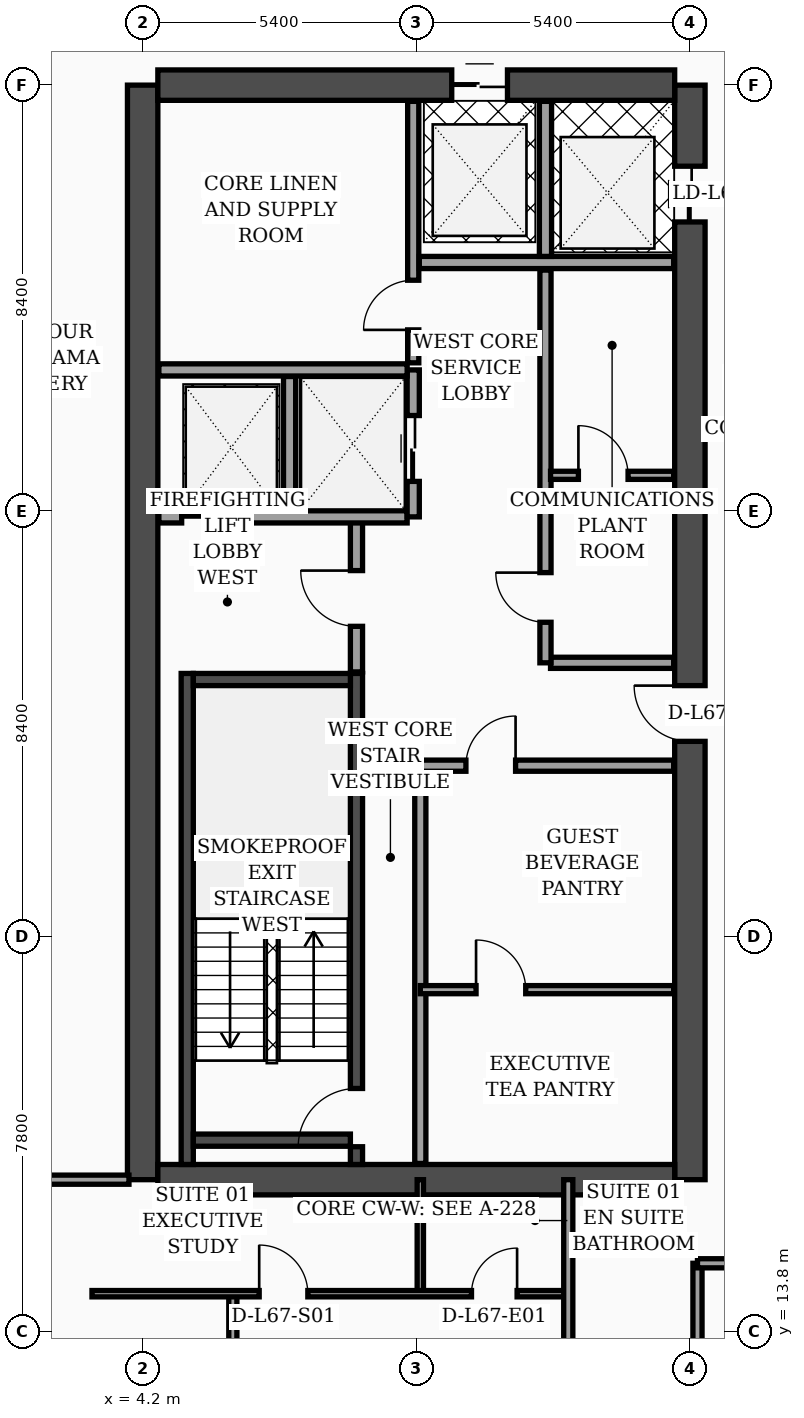
"""IFC4 building model, lengths in metres.
Left out: names, types, materials, properties, quantities, classifications, styles, units other than length and angle.
Written with IfcOpenShell. Run it as: python <this file> out.ifc"""

import sys

from ifc_helpers import new_model, si_unit, direction, frame, frame_2d, origin, place, context, subcontext, project, spatial, rectangle, extrude, element, fill, save


model = new_model("IFC4")
c1 = context("Model", 3, precision=1e-05, world=origin(), true_north=direction((0.0, 1.0)))
c2 = subcontext(c1, "Body", "Model", "MODEL_VIEW")
j1 = project(units=[si_unit("LENGTHUNIT", "METRE"), si_unit("PLANEANGLEUNIT", "RADIAN")], contexts=[c1])
p1 = place(None, origin())
s1 = spatial("IfcSite", under=j1, at=p1, CompositionType="ELEMENT")
p2 = place(p1, origin())
s2 = spatial("IfcBuilding", under=s1, at=p2, CompositionType="ELEMENT")
p3 = place(p2, frame((0.0, 0.0, 271.1)))
s3 = spatial("IfcBuildingStorey", under=s2, at=p3, CompositionType="ELEMENT", Elevation=271.1)
p4 = place(p3, frame((4.2, 16.8, 0.0), z_axis=(0.0, 0.0, 1.0), x_axis=(0.0, 1.0, 0.0)))
e1 = element("IfcWall", 1, at=p4, inside=s3, PredefinedType="SHEAR", context=c2, shape_type="SweptSolid", body=[
    extrude(rectangle(XDim=21.6, YDim=0.6, at=frame_2d((10.8, 0.0))), origin(), (0.0, 0.0, 1.0), 3.56),
])
p5 = place(p3, frame((15.0, 16.8, 0.0), z_axis=(0.0, 0.0, 1.0), x_axis=(0.0, 1.0, 0.0)))
e2 = element("IfcWall", 2, at=p5, inside=s3, PredefinedType="SHEAR", context=c2, shape_type="SweptSolid", body=[
    extrude(rectangle(XDim=21.6, YDim=0.6, at=frame_2d((10.8, 0.0))), origin(), (0.0, 0.0, 1.0), 3.56),
])
p6 = place(p5, frame((8.65, 0.0, 0.0)))
e3 = element("IfcOpeningElement", 3, at=p6, cuts=e2, PredefinedType="OPENING", context=c2, shape_type="SweptSolid", body=[
    extrude(rectangle(XDim=1.1, YDim=2.2, at=frame_2d((0.55, 1.1))), frame((0.0, 0.31, 0.0), z_axis=(0.0, -1.0, 0.0), x_axis=(1.0, 0.0, 0.0)), (0.0, 0.0, 1.0), 0.62),
])
p7 = place(p5, frame((18.9, 0.0, 0.0)))
e4 = element("IfcOpeningElement", 4, at=p7, cuts=e2, PredefinedType="OPENING", context=c2, shape_type="SweptSolid", body=[
    extrude(rectangle(XDim=1.1, YDim=2.2, at=frame_2d((0.55, 1.1))), frame((0.0, 0.31, 0.0), z_axis=(0.0, -1.0, 0.0), x_axis=(1.0, 0.0, 0.0)), (0.0, 0.0, 1.0), 0.62),
])
p8 = place(p3, frame((4.5, 38.4, 0.0), z_axis=(0.0, 0.0, 1.0), x_axis=(1.0, 0.0, 0.0)))
e5 = element("IfcWall", 5, at=p8, inside=s3, PredefinedType="SHEAR", context=c2, shape_type="SweptSolid", body=[
    extrude(rectangle(XDim=10.2, YDim=0.6, at=frame_2d((5.1, 0.0))), origin(), (0.0, 0.0, 1.0), 3.56),
])
p9 = place(p8, frame((5.8, 0.0, 0.0)))
e6 = element("IfcOpeningElement", 6, at=p9, cuts=e5, PredefinedType="OPENING", context=c2, shape_type="SweptSolid", body=[
    extrude(rectangle(XDim=1.1, YDim=2.2, at=frame_2d((0.55, 1.1))), frame((0.0, 0.31, 0.0), z_axis=(0.0, -1.0, 0.0), x_axis=(1.0, 0.0, 0.0)), (0.0, 0.0, 1.0), 0.62),
])
p10 = place(p3, frame((4.5, 16.8, 0.0), z_axis=(0.0, 0.0, 1.0), x_axis=(1.0, 0.0, 0.0)))
e7 = element("IfcWall", 7, at=p10, inside=s3, PredefinedType="SHEAR", context=c2, shape_type="SweptSolid", body=[
    extrude(rectangle(XDim=10.2, YDim=0.6, at=frame_2d((5.1, 0.0))), origin(), (0.0, 0.0, 1.0), 3.56),
])
p11 = place(p3, frame((5.08, 17.1, 0.0), z_axis=(0.0, 0.0, 1.0), x_axis=(0.0, 1.0, 0.0)))
e8 = element("IfcWall", 8, at=p11, inside=s3, PredefinedType="SOLIDWALL", context=c2, shape_type="SweptSolid", body=[
    extrude(rectangle(XDim=9.69, YDim=0.24, at=frame_2d((4.845, 0.0))), origin(), (0.0, 0.0, 1.0), 3.56),
])
p12 = place(p3, frame((8.42, 17.1, 0.0), z_axis=(0.0, 0.0, 1.0), x_axis=(0.0, 1.0, 0.0)))
e9 = element("IfcWall", 9, at=p12, inside=s3, PredefinedType="SOLIDWALL", context=c2, shape_type="SweptSolid", body=[
    extrude(rectangle(XDim=9.69, YDim=0.24, at=frame_2d((4.845, 0.0))), origin(), (0.0, 0.0, 1.0), 3.56),
])
p13 = place(p12, frame((0.35, 0.0, 0.0)))
e10 = element("IfcOpeningElement", 10, at=p13, cuts=e9, PredefinedType="OPENING", context=c2, shape_type="SweptSolid", body=[
    extrude(rectangle(XDim=1.15, YDim=2.2, at=frame_2d((0.575, 1.1))), frame((0.0, 0.13, 0.0), z_axis=(0.0, -1.0, 0.0), x_axis=(1.0, 0.0, 0.0)), (0.0, 0.0, 1.0), 0.26),
])
for number, where, z_axis, x_axis in (
    (11, (5.2, 17.58, 0.0), (0.0, 0.0, 1.0), (1.0, 0.0, 0.0)),
    (12, (5.2, 26.67, 0.0), (0.0, 0.0, 1.0), (1.0, 0.0, 0.0)),
):
    element("IfcWall", number, at=place(p3, frame(where, z_axis=z_axis, x_axis=x_axis)), inside=s3, PredefinedType="SOLIDWALL", context=c2, shape_type="SweptSolid", body=[
        extrude(rectangle(XDim=3.1, YDim=0.24, at=frame_2d((1.55, 0.0))), origin(), (0.0, 0.0, 1.0), 3.56),
    ])
p14 = place(p3, frame((8.42, 26.82, 0.0), z_axis=(0.0, 0.0, 1.0), x_axis=(0.0, 1.0, 0.0)))
e13 = element("IfcWall", 13, at=p14, inside=s3, PredefinedType="SOLIDWALL", context=c2, shape_type="SweptSolid", body=[
    extrude(rectangle(XDim=3.0, YDim=0.24, at=frame_2d((1.5, 0.0))), origin(), (0.0, 0.0, 1.0), 3.56),
])
p15 = place(p14, frame((0.9, 0.0, 0.0)))
e14 = element("IfcOpeningElement", 14, at=p15, cuts=e13, PredefinedType="OPENING", context=c2, shape_type="SweptSolid", body=[
    extrude(rectangle(XDim=1.1, YDim=2.2, at=frame_2d((0.55, 1.1))), frame((0.0, 0.13, 0.0), z_axis=(0.0, -1.0, 0.0), x_axis=(1.0, 0.0, 0.0)), (0.0, 0.0, 1.0), 0.26),
])
p16 = place(p3, frame((4.52, 29.88, 0.0), z_axis=(0.0, 0.0, 1.0), x_axis=(1.0, 0.0, 0.0)))
e15 = element("IfcWall", 15, at=p16, inside=s3, PredefinedType="SOLIDWALL", context=c2, shape_type="SweptSolid", body=[
    extrude(rectangle(XDim=4.9, YDim=0.24, at=frame_2d((2.45, 0.0))), origin(), (0.0, 0.0, 1.0), 3.56),
])
p17 = place(p16, frame((0.45, 0.0, 0.0)))
e16 = element("IfcOpeningElement", 16, at=p17, cuts=e15, PredefinedType="OPENING", context=c2, shape_type="SweptSolid", body=[
    extrude(rectangle(XDim=1.3, YDim=2.35, at=frame_2d((0.65, 1.175))), frame((0.0, 0.13, 0.0), z_axis=(0.0, -1.0, 0.0), x_axis=(1.0, 0.0, 0.0)), (0.0, 0.0, 1.0), 0.26),
])
p18 = place(p3, frame((7.1, 30.02, 0.0), z_axis=(0.0, 0.0, 1.0), x_axis=(0.0, 1.0, 0.0)))
e17 = element("IfcWall", 17, at=p18, inside=s3, PredefinedType="SOLIDWALL", context=c2, shape_type="SweptSolid", body=[
    extrude(rectangle(XDim=2.63, YDim=0.24, at=frame_2d((1.315, 0.0))), origin(), (0.0, 0.0, 1.0), 3.56),
])
p19 = place(p3, frame((9.54, 29.88, 0.0), z_axis=(0.0, 0.0, 1.0), x_axis=(0.0, 1.0, 0.0)))
e18 = element("IfcWall", 18, at=p19, inside=s3, PredefinedType="SOLIDWALL", context=c2, shape_type="SweptSolid", body=[
    extrude(rectangle(XDim=2.9, YDim=0.24, at=frame_2d((1.45, 0.0))), origin(), (0.0, 0.0, 1.0), 3.56),
])
p20 = place(p19, frame((0.7, 0.0, 0.0)))
e19 = element("IfcOpeningElement", 19, at=p20, cuts=e18, PredefinedType="OPENING", context=c2, shape_type="SweptSolid", body=[
    extrude(rectangle(XDim=1.3, YDim=2.35, at=frame_2d((0.65, 1.175))), frame((0.0, 0.13, 0.0), z_axis=(0.0, -1.0, 0.0), x_axis=(1.0, 0.0, 0.0)), (0.0, 0.0, 1.0), 0.26),
])
p21 = place(p3, frame((4.52, 32.78, 0.0), z_axis=(0.0, 0.0, 1.0), x_axis=(1.0, 0.0, 0.0)))
e20 = element("IfcWall", 20, at=p21, inside=s3, PredefinedType="SOLIDWALL", context=c2, shape_type="SweptSolid", body=[
    extrude(rectangle(XDim=4.9, YDim=0.24, at=frame_2d((2.45, 0.0))), origin(), (0.0, 0.0, 1.0), 3.19),
])
p22 = place(p3, frame((9.68, 17.12, 0.0), z_axis=(0.0, 0.0, 1.0), x_axis=(0.0, 1.0, 0.0)))
e21 = element("IfcWall", 21, at=p22, inside=s3, PredefinedType="SOLIDWALL", context=c2, shape_type="SweptSolid", body=[
    extrude(rectangle(XDim=7.88, YDim=0.22, at=frame_2d((3.94, 0.0))), origin(), (0.0, 0.0, 1.0), 3.56),
])
p23 = place(p3, frame((9.54, 32.92, 0.0), z_axis=(0.0, 0.0, 1.0), x_axis=(0.0, 1.0, 0.0)))
e22 = element("IfcWall", 22, at=p23, inside=s3, PredefinedType="SOLIDWALL", context=c2, shape_type="SweptSolid", body=[
    extrude(rectangle(XDim=5.16, YDim=0.22, at=frame_2d((2.58, 0.0))), origin(), (0.0, 0.0, 1.0), 3.56),
])
p24 = place(p23, frame((0.65, 0.0, 0.0)))
e23 = element("IfcOpeningElement", 23, at=p24, cuts=e22, PredefinedType="OPENING", context=c2, shape_type="SweptSolid", body=[
    extrude(rectangle(XDim=0.98, YDim=2.15, at=frame_2d((0.49, 1.075))), frame((0.0, 0.12, 0.0), z_axis=(0.0, -1.0, 0.0), x_axis=(1.0, 0.0, 0.0)), (0.0, 0.0, 1.0), 0.24),
])
p25 = place(p3, frame((9.68, 20.55, 0.0), z_axis=(0.0, 0.0, 1.0), x_axis=(1.0, 0.0, 0.0)))
e24 = element("IfcWall", 24, at=p25, inside=s3, PredefinedType="PARTITIONING", context=c2, shape_type="SweptSolid", body=[
    extrude(rectangle(XDim=5.0, YDim=0.16, at=frame_2d((2.5, 0.0))), origin(), (0.0, 0.0, 1.0), 3.56),
])
p26 = place(p25, frame((1.1, 0.0, 0.0)))
e25 = element("IfcOpeningElement", 25, at=p26, cuts=e24, PredefinedType="OPENING", context=c2, shape_type="SweptSolid", body=[
    extrude(rectangle(XDim=0.98, YDim=2.15, at=frame_2d((0.49, 1.075))), frame((0.0, 0.09, 0.0), z_axis=(0.0, -1.0, 0.0), x_axis=(1.0, 0.0, 0.0)), (0.0, 0.0, 1.0), 0.18),
])
p27 = place(p3, frame((9.68, 24.97, 0.0), z_axis=(0.0, 0.0, 1.0), x_axis=(1.0, 0.0, 0.0)))
e26 = element("IfcWall", 26, at=p27, inside=s3, PredefinedType="SOLIDWALL", context=c2, shape_type="SweptSolid", body=[
    extrude(rectangle(XDim=5.0, YDim=0.22, at=frame_2d((2.5, 0.0))), origin(), (0.0, 0.0, 1.0), 2.99),
])
p28 = place(p27, frame((0.9, 0.0, 0.0)))
e27 = element("IfcOpeningElement", 27, at=p28, cuts=e26, PredefinedType="OPENING", context=c2, shape_type="SweptSolid", body=[
    extrude(rectangle(XDim=0.98, YDim=2.15, at=frame_2d((0.49, 1.075))), frame((0.0, 0.12, 0.0), z_axis=(0.0, -1.0, 0.0), x_axis=(1.0, 0.0, 0.0)), (0.0, 0.0, 1.0), 0.24),
])
p29 = place(p3, frame((12.25, 27.0, 0.0), z_axis=(0.0, 0.0, 1.0), x_axis=(1.0, 0.0, 0.0)))
e28 = element("IfcWall", 28, at=p29, inside=s3, PredefinedType="SOLIDWALL", context=c2, shape_type="SweptSolid", body=[
    extrude(rectangle(XDim=2.43, YDim=0.22, at=frame_2d((1.215, 0.0))), origin(), (0.0, 0.0, 1.0), 3.56),
])
p30 = place(p3, frame((12.15, 27.0, 0.0), z_axis=(0.0, 0.0, 1.0), x_axis=(0.0, 1.0, 0.0)))
e29 = element("IfcWall", 29, at=p30, inside=s3, PredefinedType="SOLIDWALL", context=c2, shape_type="SweptSolid", body=[
    extrude(rectangle(XDim=7.75, YDim=0.22, at=frame_2d((3.875, 0.0))), origin(), (0.0, 0.0, 1.0), 3.56),
])
p31 = place(p30, frame((0.8, 0.0, 0.0)))
e30 = element("IfcOpeningElement", 30, at=p31, cuts=e29, PredefinedType="OPENING", context=c2, shape_type="SweptSolid", body=[
    extrude(rectangle(XDim=0.98, YDim=2.15, at=frame_2d((0.49, 1.075))), frame((0.0, 0.12, 0.0), z_axis=(0.0, -1.0, 0.0), x_axis=(1.0, 0.0, 0.0)), (0.0, 0.0, 1.0), 0.24),
])
p32 = place(p3, frame((12.25, 30.7, 0.0), z_axis=(0.0, 0.0, 1.0), x_axis=(1.0, 0.0, 0.0)))
e31 = element("IfcWall", 31, at=p32, inside=s3, PredefinedType="PARTITIONING", context=c2, shape_type="SweptSolid", body=[
    extrude(rectangle(XDim=2.43, YDim=0.16, at=frame_2d((1.215, 0.0))), origin(), (0.0, 0.0, 1.0), 3.56),
])
p33 = place(p32, frame((0.55, 0.0, 0.0)))
e32 = element("IfcOpeningElement", 32, at=p33, cuts=e31, PredefinedType="OPENING", context=c2, shape_type="SweptSolid", body=[
    extrude(rectangle(XDim=0.98, YDim=2.15, at=frame_2d((0.49, 1.075))), frame((0.0, 0.09, 0.0), z_axis=(0.0, -1.0, 0.0), x_axis=(1.0, 0.0, 0.0)), (0.0, 0.0, 1.0), 0.18),
])
p34 = place(p3, frame((9.66, 34.9, 0.0), z_axis=(0.0, 0.0, 1.0), x_axis=(1.0, 0.0, 0.0)))
e33 = element("IfcWall", 33, at=p34, inside=s3, PredefinedType="SOLIDWALL", context=c2, shape_type="SweptSolid", body=[
    extrude(rectangle(XDim=5.02, YDim=0.24, at=frame_2d((2.51, 0.0))), origin(), (0.0, 0.0, 1.0), 3.56),
])
p35 = place(p3, frame((12.15, 35.02, 0.0), z_axis=(0.0, 0.0, 1.0), x_axis=(0.0, 1.0, 0.0)))
e34 = element("IfcWall", 34, at=p35, inside=s3, PredefinedType="SOLIDWALL", context=c2, shape_type="SweptSolid", body=[
    extrude(rectangle(XDim=3.06, YDim=0.24, at=frame_2d((1.53, 0.0))), origin(), (0.0, 0.0, 1.0), 3.56),
])
p36 = place(p3, frame((0.08, 16.8, 0.0), z_axis=(0.0, 0.0, 1.0), x_axis=(1.0, 0.0, 0.0)))
e35 = element("IfcWall", 35, at=p36, inside=s3, PredefinedType="PARTITIONING", context=c2, shape_type="SweptSolid", body=[
    extrude(rectangle(XDim=3.85, YDim=0.18, at=frame_2d((1.925, 0.0))), origin(), (0.0, 0.0, 1.0), 2.99),
])
p37 = place(p3, frame((9.68, 14.55, 0.0), z_axis=(0.0, 0.0, 1.0), x_axis=(0.0, 1.0, 0.0)))
e36 = element("IfcWall", 36, at=p37, inside=s3, PredefinedType="PARTITIONING", context=c2, shape_type="SweptSolid", body=[
    extrude(rectangle(XDim=2.25, YDim=0.125, at=frame_2d((1.125, 0.0))), origin(), (0.0, 0.0, 1.0), 3.56),
])
p38 = place(p3, frame((5.98, 2.44, 0.0), z_axis=(0.0, 0.0, 1.0), x_axis=(0.0, 1.0, 0.0)))
e37 = element("IfcWall", 37, at=p38, inside=s3, PredefinedType="PARTITIONING", context=c2, shape_type="SweptSolid", body=[
    extrude(rectangle(XDim=12.11, YDim=0.16, at=frame_2d((6.055, 0.0))), origin(), (0.0, 0.0, 1.0), 3.09),
])
p39 = place(p38, frame((5.58, 0.0, 0.0)))
e38 = element("IfcOpeningElement", 38, at=p39, cuts=e37, PredefinedType="OPENING", context=c2, shape_type="SweptSolid", body=[
    extrude(rectangle(XDim=0.96, YDim=2.2, at=frame_2d((0.48, 1.1))), frame((0.0, 0.09, 0.0), z_axis=(0.0, -1.0, 0.0), x_axis=(1.0, 0.0, 0.0)), (0.0, 0.0, 1.0), 0.18),
])
p40 = place(p3, frame((3.2, 14.55, 0.0), z_axis=(0.0, 0.0, 1.0), x_axis=(1.0, 0.0, 0.0)))
e39 = element("IfcWall", 39, at=p40, inside=s3, PredefinedType="PARTITIONING", context=c2, shape_type="SweptSolid", body=[
    extrude(rectangle(XDim=9.4, YDim=0.125, at=frame_2d((4.7, 0.0))), origin(), (0.0, 0.0, 1.0), 2.99),
])
p41 = place(p40, frame((3.3, 0.0, 0.0)))
e40 = element("IfcOpeningElement", 40, at=p41, cuts=e39, PredefinedType="OPENING", context=c2, shape_type="SweptSolid", body=[
    extrude(rectangle(XDim=0.96, YDim=2.2, at=frame_2d((0.48, 1.1))), frame((0.0, 0.073, 0.0), z_axis=(0.0, -1.0, 0.0), x_axis=(1.0, 0.0, 0.0)), (0.0, 0.0, 1.0), 0.145),
])
p42 = place(p40, frame((7.49, 0.0, 0.0)))
e41 = element("IfcOpeningElement", 41, at=p42, cuts=e39, PredefinedType="OPENING", context=c2, shape_type="SweptSolid", body=[
    extrude(rectangle(XDim=0.9, YDim=2.15, at=frame_2d((0.45, 1.075))), frame((0.0, 0.073, 0.0), z_axis=(0.0, -1.0, 0.0), x_axis=(1.0, 0.0, 0.0)), (0.0, 0.0, 1.0), 0.145),
])
p43 = place(p3, frame((12.6, 2.44, 0.0), z_axis=(0.0, 0.0, 1.0), x_axis=(0.0, 1.0, 0.0)))
e42 = element("IfcWall", 42, at=p43, inside=s3, PredefinedType="PARTITIONING", context=c2, shape_type="SweptSolid", body=[
    extrude(rectangle(XDim=14.36, YDim=0.18, at=frame_2d((7.18, 0.0))), origin(), (0.0, 0.0, 1.0), 2.99),
])
p44 = place(p43, frame((3.01, 0.0, 0.0)))
e43 = element("IfcOpeningElement", 43, at=p44, cuts=e42, PredefinedType="OPENING", context=c2, shape_type="SweptSolid", body=[
    extrude(rectangle(XDim=1.02, YDim=2.2, at=frame_2d((0.51, 1.1))), frame((0.0, 0.1, 0.0), z_axis=(0.0, -1.0, 0.0), x_axis=(1.0, 0.0, 0.0)), (0.0, 0.0, 1.0), 0.2),
])
p45 = place(p3, frame((15.15, 2.44, 0.0), z_axis=(0.0, 0.0, 1.0), x_axis=(0.0, 1.0, 0.0)))
e44 = element("IfcWall", 44, at=p45, inside=s3, PredefinedType="PARTITIONING", context=c2, shape_type="SweptSolid", body=[
    extrude(rectangle(XDim=12.71, YDim=0.18, at=frame_2d((6.355, 0.0))), origin(), (0.0, 0.0, 1.0), 3.09),
])
p46 = place(p3, frame((15.15, 15.15, 0.0), z_axis=(0.0, 0.0, 1.0), x_axis=(1.0, 0.0, 0.0)))
e45 = element("IfcWall", 45, at=p46, inside=s3, PredefinedType="PARTITIONING", context=c2, shape_type="SweptSolid", body=[
    extrude(rectangle(XDim=6.45, YDim=0.18, at=frame_2d((3.225, 0.0))), origin(), (0.0, 0.0, 1.0), 2.59),
])
p47 = place(p46, frame((1.74, 0.0, 0.0)))
e46 = element("IfcOpeningElement", 46, at=p47, cuts=e45, PredefinedType="OPENING", context=c2, shape_type="SweptSolid", body=[
    extrude(rectangle(XDim=1.02, YDim=2.2, at=frame_2d((0.51, 1.1))), frame((0.0, 0.1, 0.0), z_axis=(0.0, -1.0, 0.0), x_axis=(1.0, 0.0, 0.0)), (0.0, 0.0, 1.0), 0.2),
])
p48 = place(p15, origin())
e47 = element("IfcDoor", 47, at=p48, inside=s3, OperationType="SINGLE_SWING_RIGHT", PredefinedType="DOOR", context=c2, shape_type="SweptSolid", body=[
    extrude(rectangle(XDim=1.1, YDim=2.2, at=frame_2d((0.55, 1.1))), frame((0.0, 0.025, 0.0), z_axis=(0.0, -1.0, 0.0), x_axis=(1.0, 0.0, 0.0)), (0.0, 0.0, 1.0), 0.05),
])
fill(e14, e47)
p49 = place(p17, origin())
e48 = element("IfcDoor", 48, at=p49, inside=s3, OperationType="DOUBLE_DOOR_SLIDING", PredefinedType="DOOR", context=c2, shape_type="SweptSolid", body=[
    extrude(rectangle(XDim=1.3, YDim=2.35, at=frame_2d((0.65, 1.175))), frame((0.0, 0.025, 0.0), z_axis=(0.0, -1.0, 0.0), x_axis=(1.0, 0.0, 0.0)), (0.0, 0.0, 1.0), 0.05),
])
fill(e16, e48)
p50 = place(p20, origin())
e49 = element("IfcDoor", 49, at=p50, inside=s3, OperationType="DOUBLE_DOOR_SLIDING", PredefinedType="DOOR", context=c2, shape_type="SweptSolid", body=[
    extrude(rectangle(XDim=1.3, YDim=2.35, at=frame_2d((0.65, 1.175))), frame((0.0, 0.025, 0.0), z_axis=(0.0, -1.0, 0.0), x_axis=(1.0, 0.0, 0.0)), (0.0, 0.0, 1.0), 0.05),
])
fill(e19, e49)
p51 = place(p24, origin())
e50 = element("IfcDoor", 50, at=p51, inside=s3, OperationType="SINGLE_SWING_LEFT", PredefinedType="DOOR", context=c2, shape_type="SweptSolid", body=[
    extrude(rectangle(XDim=0.98, YDim=2.15, at=frame_2d((0.49, 1.075))), frame((0.0, 0.025, 0.0), z_axis=(0.0, -1.0, 0.0), x_axis=(1.0, 0.0, 0.0)), (0.0, 0.0, 1.0), 0.05),
])
fill(e23, e50)
p52 = place(p26, origin())
e51 = element("IfcDoor", 51, at=p52, inside=s3, OperationType="SINGLE_SWING_LEFT", PredefinedType="DOOR", context=c2, shape_type="SweptSolid", body=[
    extrude(rectangle(XDim=0.98, YDim=2.15, at=frame_2d((0.49, 1.075))), frame((0.0, 0.025, 0.0), z_axis=(0.0, -1.0, 0.0), x_axis=(1.0, 0.0, 0.0)), (0.0, 0.0, 1.0), 0.05),
])
fill(e25, e51)
p53 = place(p28, origin())
e52 = element("IfcDoor", 52, at=p53, inside=s3, OperationType="SINGLE_SWING_RIGHT", PredefinedType="DOOR", context=c2, shape_type="SweptSolid", body=[
    extrude(rectangle(XDim=0.98, YDim=2.15, at=frame_2d((0.49, 1.075))), frame((0.0, 0.025, 0.0), z_axis=(0.0, -1.0, 0.0), x_axis=(1.0, 0.0, 0.0)), (0.0, 0.0, 1.0), 0.05),
])
fill(e27, e52)
p54 = place(p31, origin())
e53 = element("IfcDoor", 53, at=p54, inside=s3, OperationType="SINGLE_SWING_RIGHT", PredefinedType="DOOR", context=c2, shape_type="SweptSolid", body=[
    extrude(rectangle(XDim=0.98, YDim=2.15, at=frame_2d((0.49, 1.075))), frame((0.0, 0.025, 0.0), z_axis=(0.0, -1.0, 0.0), x_axis=(1.0, 0.0, 0.0)), (0.0, 0.0, 1.0), 0.05),
])
fill(e30, e53)
p55 = place(p33, origin())
e54 = element("IfcDoor", 54, at=p55, inside=s3, OperationType="SINGLE_SWING_LEFT", PredefinedType="DOOR", context=c2, shape_type="SweptSolid", body=[
    extrude(rectangle(XDim=0.98, YDim=2.15, at=frame_2d((0.49, 1.075))), frame((0.0, 0.025, 0.0), z_axis=(0.0, -1.0, 0.0), x_axis=(1.0, 0.0, 0.0)), (0.0, 0.0, 1.0), 0.05),
])
fill(e32, e54)
p56 = place(p41, origin())
e55 = element("IfcDoor", 55, at=p56, inside=s3, OperationType="SINGLE_SWING_LEFT", PredefinedType="DOOR", context=c2, shape_type="SweptSolid", body=[
    extrude(rectangle(XDim=0.96, YDim=2.2, at=frame_2d((0.48, 1.1))), frame((0.0, 0.025, 0.0), z_axis=(0.0, -1.0, 0.0), x_axis=(1.0, 0.0, 0.0)), (0.0, 0.0, 1.0), 0.05),
])
fill(e40, e55)
p57 = place(p42, origin())
e56 = element("IfcDoor", 56, at=p57, inside=s3, OperationType="SINGLE_SWING_RIGHT", PredefinedType="DOOR", context=c2, shape_type="SweptSolid", body=[
    extrude(rectangle(XDim=0.9, YDim=2.15, at=frame_2d((0.45, 1.075))), frame((0.0, 0.025, 0.0), z_axis=(0.0, -1.0, 0.0), x_axis=(1.0, 0.0, 0.0)), (0.0, 0.0, 1.0), 0.05),
])
fill(e41, e56)
p58 = place(p13, origin())
e57 = element("IfcDoor", 57, at=p58, inside=s3, OperationType="SINGLE_SWING_LEFT", PredefinedType="DOOR", context=c2, shape_type="SweptSolid", body=[
    extrude(rectangle(XDim=1.15, YDim=2.2, at=frame_2d((0.575, 1.1))), frame((0.0, 0.025, 0.0), z_axis=(0.0, -1.0, 0.0), x_axis=(1.0, 0.0, 0.0)), (0.0, 0.0, 1.0), 0.05),
])
fill(e10, e57)
p59 = place(p6, origin())
e58 = element("IfcDoor", 58, at=p59, inside=s3, OperationType="SINGLE_SWING_RIGHT", PredefinedType="DOOR", context=c2, shape_type="SweptSolid", body=[
    extrude(rectangle(XDim=1.1, YDim=2.2, at=frame_2d((0.55, 1.1))), frame((0.0, 0.025, 0.0), z_axis=(0.0, -1.0, 0.0), x_axis=(1.0, 0.0, 0.0)), (0.0, 0.0, 1.0), 0.05),
])
fill(e3, e58)
p60 = place(p7, origin())
e59 = element("IfcDoor", 59, at=p60, inside=s3, OperationType="DOUBLE_DOOR_SLIDING", PredefinedType="DOOR", context=c2, shape_type="SweptSolid", body=[
    extrude(rectangle(XDim=1.1, YDim=2.2, at=frame_2d((0.55, 1.1))), frame((0.0, 0.025, 0.0), z_axis=(0.0, -1.0, 0.0), x_axis=(1.0, 0.0, 0.0)), (0.0, 0.0, 1.0), 0.05),
])
fill(e4, e59)
p61 = place(p9, origin())
e60 = element("IfcDoor", 60, at=p61, inside=s3, OperationType="DOUBLE_DOOR_SLIDING", PredefinedType="DOOR", context=c2, shape_type="SweptSolid", body=[
    extrude(rectangle(XDim=1.1, YDim=2.2, at=frame_2d((0.55, 1.1))), frame((0.0, 0.025, 0.0), z_axis=(0.0, -1.0, 0.0), x_axis=(1.0, 0.0, 0.0)), (0.0, 0.0, 1.0), 0.05),
])
fill(e6, e60)
save(model, sys.argv[1])
